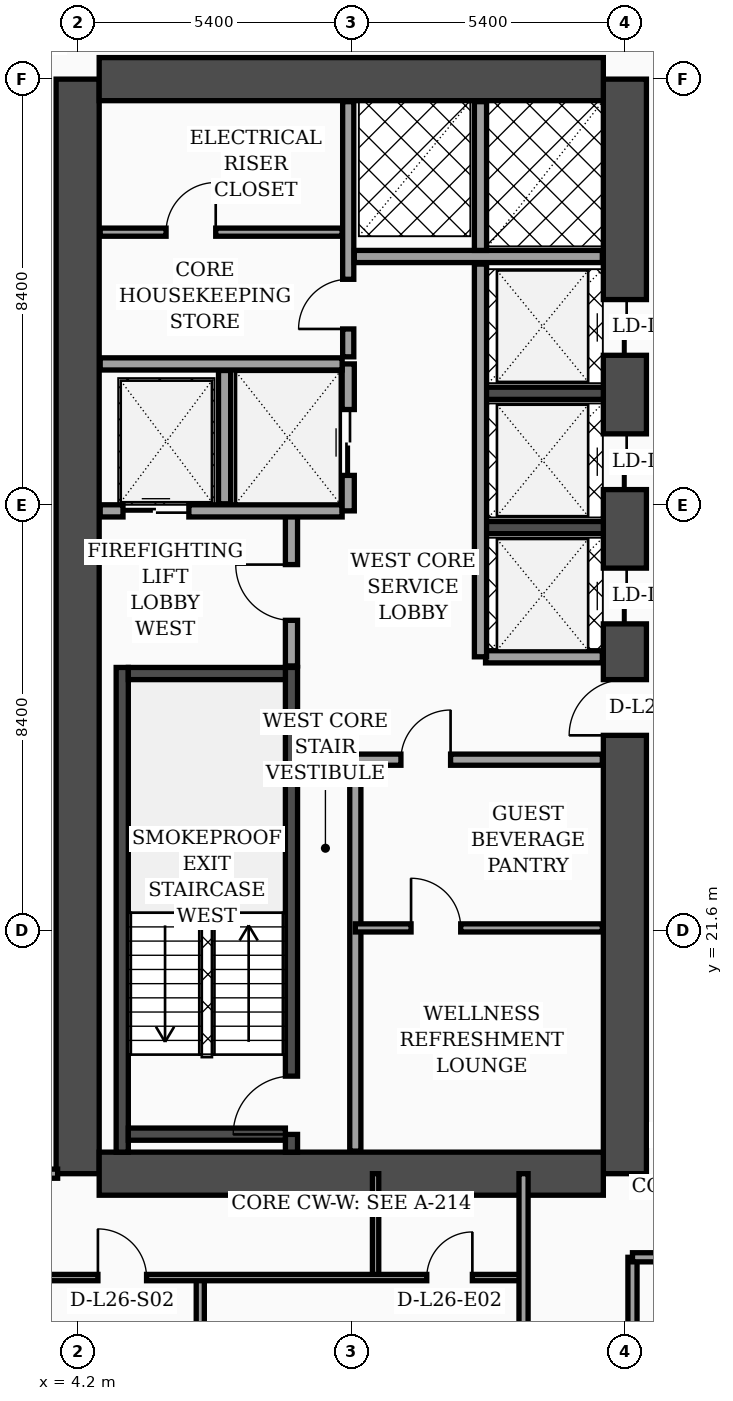
"""IFC4 building model, lengths in metres.
Left out: names, types, materials, properties, quantities, classifications, styles, units other than length and angle.
Written with IfcOpenShell. Run it as: python <this file> out.ifc"""

import sys

from ifc_helpers import new_model, si_unit, direction, frame, frame_2d, origin, place, context, subcontext, project, spatial, rectangle, extrude, element, fill, save


model = new_model("IFC4")
c1 = context("Model", 3, precision=1e-05, world=origin(), true_north=direction((0.0, 1.0)))
c2 = subcontext(c1, "Body", "Model", "MODEL_VIEW")
j1 = project(units=[si_unit("LENGTHUNIT", "METRE"), si_unit("PLANEANGLEUNIT", "RADIAN")], contexts=[c1])
p1 = place(None, origin())
s1 = spatial("IfcSite", under=j1, at=p1, CompositionType="ELEMENT")
p2 = place(p1, origin())
s2 = spatial("IfcBuilding", under=s1, at=p2, CompositionType="ELEMENT")
p3 = place(p2, frame((0.0, 0.0, 108.8)))
s3 = spatial("IfcBuildingStorey", under=s2, at=p3, CompositionType="ELEMENT", Elevation=108.8)
p4 = place(p3, frame((4.2, 16.8, 0.0), z_axis=(0.0, 0.0, 1.0), x_axis=(0.0, 1.0, 0.0)))
e1 = element("IfcWall", 1, at=p4, inside=s3, PredefinedType="SHEAR", context=c2, shape_type="SweptSolid", body=[
    extrude(rectangle(XDim=21.6, YDim=0.85, at=frame_2d((10.8, 0.0))), origin(), (0.0, 0.0, 1.0), 3.56),
])
p5 = place(p3, frame((15.0, 16.8, 0.0), z_axis=(0.0, 0.0, 1.0), x_axis=(0.0, 1.0, 0.0)))
e2 = element("IfcWall", 2, at=p5, inside=s3, PredefinedType="SHEAR", context=c2, shape_type="SweptSolid", body=[
    extrude(rectangle(XDim=21.6, YDim=0.85, at=frame_2d((10.8, 0.0))), origin(), (0.0, 0.0, 1.0), 3.56),
])
p6 = place(p5, frame((8.65, 0.0, 0.0)))
e3 = element("IfcOpeningElement", 3, at=p6, cuts=e2, PredefinedType="OPENING", context=c2, shape_type="SweptSolid", body=[
    extrude(rectangle(XDim=1.1, YDim=2.2, at=frame_2d((0.55, 1.1))), frame((0.0, 0.435, 0.0), z_axis=(0.0, -1.0, 0.0), x_axis=(1.0, 0.0, 0.0)), (0.0, 0.0, 1.0), 0.87),
])
p7 = place(p5, frame((10.85, 0.0, 0.0)))
e4 = element("IfcOpeningElement", 4, at=p7, cuts=e2, PredefinedType="OPENING", context=c2, shape_type="SweptSolid", body=[
    extrude(rectangle(XDim=1.1, YDim=2.2, at=frame_2d((0.55, 1.1))), frame((0.0, 0.435, 0.0), z_axis=(0.0, -1.0, 0.0), x_axis=(1.0, 0.0, 0.0)), (0.0, 0.0, 1.0), 0.87),
])
p8 = place(p5, frame((13.5, 0.0, 0.0)))
e5 = element("IfcOpeningElement", 5, at=p8, cuts=e2, PredefinedType="OPENING", context=c2, shape_type="SweptSolid", body=[
    extrude(rectangle(XDim=1.1, YDim=2.2, at=frame_2d((0.55, 1.1))), frame((0.0, 0.435, 0.0), z_axis=(0.0, -1.0, 0.0), x_axis=(1.0, 0.0, 0.0)), (0.0, 0.0, 1.0), 0.87),
])
p9 = place(p5, frame((16.15, 0.0, 0.0)))
e6 = element("IfcOpeningElement", 6, at=p9, cuts=e2, PredefinedType="OPENING", context=c2, shape_type="SweptSolid", body=[
    extrude(rectangle(XDim=1.1, YDim=2.2, at=frame_2d((0.55, 1.1))), frame((0.0, 0.435, 0.0), z_axis=(0.0, -1.0, 0.0), x_axis=(1.0, 0.0, 0.0)), (0.0, 0.0, 1.0), 0.87),
])
for number, where, z_axis, x_axis in (
    (7, (4.625, 38.4, 0.0), (0.0, 0.0, 1.0), (1.0, 0.0, 0.0)),
    (8, (4.625, 16.8, 0.0), (0.0, 0.0, 1.0), (1.0, 0.0, 0.0)),
):
    element("IfcWall", number, at=place(p3, frame(where, z_axis=z_axis, x_axis=x_axis)), inside=s3, PredefinedType="SHEAR", context=c2, shape_type="SweptSolid", body=[
        extrude(rectangle(XDim=9.95, YDim=0.85, at=frame_2d((4.975, 0.0))), origin(), (0.0, 0.0, 1.0), 3.56),
    ])
p10 = place(p3, frame((5.08, 17.225, 0.0), z_axis=(0.0, 0.0, 1.0), x_axis=(0.0, 1.0, 0.0)))
e9 = element("IfcWall", 9, at=p10, inside=s3, PredefinedType="SOLIDWALL", context=c2, shape_type="SweptSolid", body=[
    extrude(rectangle(XDim=9.565, YDim=0.24, at=frame_2d((4.782, 0.0))), origin(), (0.0, 0.0, 1.0), 3.56),
])
p11 = place(p3, frame((8.42, 17.225, 0.0), z_axis=(0.0, 0.0, 1.0), x_axis=(0.0, 1.0, 0.0)))
e10 = element("IfcWall", 10, at=p11, inside=s3, PredefinedType="SOLIDWALL", context=c2, shape_type="SweptSolid", body=[
    extrude(rectangle(XDim=9.565, YDim=0.24, at=frame_2d((4.782, 0.0))), origin(), (0.0, 0.0, 1.0), 3.56),
])
p12 = place(p11, frame((0.35, 0.0, 0.0)))
e11 = element("IfcOpeningElement", 11, at=p12, cuts=e10, PredefinedType="OPENING", context=c2, shape_type="SweptSolid", body=[
    extrude(rectangle(XDim=1.15, YDim=2.2, at=frame_2d((0.575, 1.1))), frame((0.0, 0.13, 0.0), z_axis=(0.0, -1.0, 0.0), x_axis=(1.0, 0.0, 0.0)), (0.0, 0.0, 1.0), 0.26),
])
for number, where, z_axis, x_axis in (
    (12, (5.2, 17.58, 0.0), (0.0, 0.0, 1.0), (1.0, 0.0, 0.0)),
    (13, (5.2, 26.67, 0.0), (0.0, 0.0, 1.0), (1.0, 0.0, 0.0)),
):
    element("IfcWall", number, at=place(p3, frame(where, z_axis=z_axis, x_axis=x_axis)), inside=s3, PredefinedType="SOLIDWALL", context=c2, shape_type="SweptSolid", body=[
        extrude(rectangle(XDim=3.1, YDim=0.24, at=frame_2d((1.55, 0.0))), origin(), (0.0, 0.0, 1.0), 3.56),
    ])
for number, where, z_axis, x_axis in (
    (14, (12.18, 29.55, 0.0), (0.0, 0.0, 1.0), (1.0, 0.0, 0.0)),
    (15, (12.18, 32.2, 0.0), (0.0, 0.0, 1.0), (1.0, 0.0, 0.0)),
):
    element("IfcWall", number, at=place(p3, frame(where, z_axis=z_axis, x_axis=x_axis)), inside=s3, PredefinedType="SOLIDWALL", context=c2, shape_type="SweptSolid", body=[
        extrude(rectangle(XDim=2.395, YDim=0.24, at=frame_2d((1.198, 0.0))), origin(), (0.0, 0.0, 1.0), 3.56),
    ])
p13 = place(p3, frame((8.42, 26.82, 0.0), z_axis=(0.0, 0.0, 1.0), x_axis=(0.0, 1.0, 0.0)))
e16 = element("IfcWall", 16, at=p13, inside=s3, PredefinedType="SOLIDWALL", context=c2, shape_type="SweptSolid", body=[
    extrude(rectangle(XDim=3.0, YDim=0.24, at=frame_2d((1.5, 0.0))), origin(), (0.0, 0.0, 1.0), 3.56),
])
p14 = place(p13, frame((0.9, 0.0, 0.0)))
e17 = element("IfcOpeningElement", 17, at=p14, cuts=e16, PredefinedType="OPENING", context=c2, shape_type="SweptSolid", body=[
    extrude(rectangle(XDim=1.1, YDim=2.2, at=frame_2d((0.55, 1.1))), frame((0.0, 0.13, 0.0), z_axis=(0.0, -1.0, 0.0), x_axis=(1.0, 0.0, 0.0)), (0.0, 0.0, 1.0), 0.26),
])
p15 = place(p3, frame((4.645, 29.88, 0.0), z_axis=(0.0, 0.0, 1.0), x_axis=(1.0, 0.0, 0.0)))
e18 = element("IfcWall", 18, at=p15, inside=s3, PredefinedType="SOLIDWALL", context=c2, shape_type="SweptSolid", body=[
    extrude(rectangle(XDim=4.775, YDim=0.24, at=frame_2d((2.387, 0.0))), origin(), (0.0, 0.0, 1.0), 3.56),
])
p16 = place(p15, frame((0.45, 0.0, 0.0)))
e19 = element("IfcOpeningElement", 19, at=p16, cuts=e18, PredefinedType="OPENING", context=c2, shape_type="SweptSolid", body=[
    extrude(rectangle(XDim=1.3, YDim=2.35, at=frame_2d((0.65, 1.175))), frame((0.0, 0.13, 0.0), z_axis=(0.0, -1.0, 0.0), x_axis=(1.0, 0.0, 0.0)), (0.0, 0.0, 1.0), 0.26),
])
p17 = place(p3, frame((7.1, 30.02, 0.0), z_axis=(0.0, 0.0, 1.0), x_axis=(0.0, 1.0, 0.0)))
e20 = element("IfcWall", 20, at=p17, inside=s3, PredefinedType="SOLIDWALL", context=c2, shape_type="SweptSolid", body=[
    extrude(rectangle(XDim=2.63, YDim=0.24, at=frame_2d((1.315, 0.0))), origin(), (0.0, 0.0, 1.0), 3.56),
])
p18 = place(p3, frame((9.54, 29.88, 0.0), z_axis=(0.0, 0.0, 1.0), x_axis=(0.0, 1.0, 0.0)))
e21 = element("IfcWall", 21, at=p18, inside=s3, PredefinedType="SOLIDWALL", context=c2, shape_type="SweptSolid", body=[
    extrude(rectangle(XDim=2.9, YDim=0.24, at=frame_2d((1.45, 0.0))), origin(), (0.0, 0.0, 1.0), 3.56),
])
p19 = place(p18, frame((0.7, 0.0, 0.0)))
e22 = element("IfcOpeningElement", 22, at=p19, cuts=e21, PredefinedType="OPENING", context=c2, shape_type="SweptSolid", body=[
    extrude(rectangle(XDim=1.3, YDim=2.35, at=frame_2d((0.65, 1.175))), frame((0.0, 0.13, 0.0), z_axis=(0.0, -1.0, 0.0), x_axis=(1.0, 0.0, 0.0)), (0.0, 0.0, 1.0), 0.26),
])
p20 = place(p3, frame((4.645, 32.78, 0.0), z_axis=(0.0, 0.0, 1.0), x_axis=(1.0, 0.0, 0.0)))
e23 = element("IfcWall", 23, at=p20, inside=s3, PredefinedType="SOLIDWALL", context=c2, shape_type="SweptSolid", body=[
    extrude(rectangle(XDim=4.775, YDim=0.24, at=frame_2d((2.387, 0.0))), origin(), (0.0, 0.0, 1.0), 3.19),
])
p21 = place(p3, frame((9.68, 17.245, 0.0), z_axis=(0.0, 0.0, 1.0), x_axis=(0.0, 1.0, 0.0)))
e24 = element("IfcWall", 24, at=p21, inside=s3, PredefinedType="SOLIDWALL", context=c2, shape_type="SweptSolid", body=[
    extrude(rectangle(XDim=7.755, YDim=0.22, at=frame_2d((3.877, 0.0))), origin(), (0.0, 0.0, 1.0), 3.56),
])
p22 = place(p3, frame((4.645, 35.38, 0.0), z_axis=(0.0, 0.0, 1.0), x_axis=(1.0, 0.0, 0.0)))
e25 = element("IfcWall", 25, at=p22, inside=s3, PredefinedType="PARTITIONING", context=c2, shape_type="SweptSolid", body=[
    extrude(rectangle(XDim=4.775, YDim=0.16, at=frame_2d((2.387, 0.0))), origin(), (0.0, 0.0, 1.0), 3.56),
])
p23 = place(p22, frame((1.3, 0.0, 0.0)))
e26 = element("IfcOpeningElement", 26, at=p23, cuts=e25, PredefinedType="OPENING", context=c2, shape_type="SweptSolid", body=[
    extrude(rectangle(XDim=0.98, YDim=2.15, at=frame_2d((0.49, 1.075))), frame((0.0, 0.09, 0.0), z_axis=(0.0, -1.0, 0.0), x_axis=(1.0, 0.0, 0.0)), (0.0, 0.0, 1.0), 0.18),
])
p24 = place(p3, frame((9.54, 32.92, 0.0), z_axis=(0.0, 0.0, 1.0), x_axis=(0.0, 1.0, 0.0)))
e27 = element("IfcWall", 27, at=p24, inside=s3, PredefinedType="SOLIDWALL", context=c2, shape_type="SweptSolid", body=[
    extrude(rectangle(XDim=5.035, YDim=0.22, at=frame_2d((2.518, 0.0))), origin(), (0.0, 0.0, 1.0), 3.56),
])
p25 = place(p24, frame((0.55, 0.0, 0.0)))
e28 = element("IfcOpeningElement", 28, at=p25, cuts=e27, PredefinedType="OPENING", context=c2, shape_type="SweptSolid", body=[
    extrude(rectangle(XDim=0.98, YDim=2.15, at=frame_2d((0.49, 1.075))), frame((0.0, 0.12, 0.0), z_axis=(0.0, -1.0, 0.0), x_axis=(1.0, 0.0, 0.0)), (0.0, 0.0, 1.0), 0.24),
])
p26 = place(p3, frame((9.68, 21.65, 0.0), z_axis=(0.0, 0.0, 1.0), x_axis=(1.0, 0.0, 0.0)))
e29 = element("IfcWall", 29, at=p26, inside=s3, PredefinedType="PARTITIONING", context=c2, shape_type="SweptSolid", body=[
    extrude(rectangle(XDim=4.875, YDim=0.16, at=frame_2d((2.438, 0.0))), origin(), (0.0, 0.0, 1.0), 3.09),
])
p27 = place(p26, frame((1.1, 0.0, 0.0)))
e30 = element("IfcOpeningElement", 30, at=p27, cuts=e29, PredefinedType="OPENING", context=c2, shape_type="SweptSolid", body=[
    extrude(rectangle(XDim=0.98, YDim=2.15, at=frame_2d((0.49, 1.075))), frame((0.0, 0.09, 0.0), z_axis=(0.0, -1.0, 0.0), x_axis=(1.0, 0.0, 0.0)), (0.0, 0.0, 1.0), 0.18),
])
p28 = place(p3, frame((9.68, 24.97, 0.0), z_axis=(0.0, 0.0, 1.0), x_axis=(1.0, 0.0, 0.0)))
e31 = element("IfcWall", 31, at=p28, inside=s3, PredefinedType="SOLIDWALL", context=c2, shape_type="SweptSolid", body=[
    extrude(rectangle(XDim=4.875, YDim=0.22, at=frame_2d((2.438, 0.0))), origin(), (0.0, 0.0, 1.0), 2.84),
])
p29 = place(p28, frame((0.9, 0.0, 0.0)))
e32 = element("IfcOpeningElement", 32, at=p29, cuts=e31, PredefinedType="OPENING", context=c2, shape_type="SweptSolid", body=[
    extrude(rectangle(XDim=0.98, YDim=2.15, at=frame_2d((0.49, 1.075))), frame((0.0, 0.12, 0.0), z_axis=(0.0, -1.0, 0.0), x_axis=(1.0, 0.0, 0.0)), (0.0, 0.0, 1.0), 0.24),
])
p30 = place(p3, frame((12.25, 27.0, 0.0), z_axis=(0.0, 0.0, 1.0), x_axis=(1.0, 0.0, 0.0)))
e33 = element("IfcWall", 33, at=p30, inside=s3, PredefinedType="SOLIDWALL", context=c2, shape_type="SweptSolid", body=[
    extrude(rectangle(XDim=2.305, YDim=0.24, at=frame_2d((1.152, 0.0))), origin(), (0.0, 0.0, 1.0), 3.56),
])
p31 = place(p3, frame((12.15, 27.0, 0.0), z_axis=(0.0, 0.0, 1.0), x_axis=(0.0, 1.0, 0.0)))
e34 = element("IfcWall", 34, at=p31, inside=s3, PredefinedType="SOLIDWALL", context=c2, shape_type="SweptSolid", body=[
    extrude(rectangle(XDim=7.75, YDim=0.24, at=frame_2d((3.875, 0.0))), origin(), (0.0, 0.0, 1.0), 3.56),
])
p32 = place(p3, frame((9.66, 34.9, 0.0), z_axis=(0.0, 0.0, 1.0), x_axis=(1.0, 0.0, 0.0)))
e35 = element("IfcWall", 35, at=p32, inside=s3, PredefinedType="SOLIDWALL", context=c2, shape_type="SweptSolid", body=[
    extrude(rectangle(XDim=4.895, YDim=0.24, at=frame_2d((2.448, 0.0))), origin(), (0.0, 0.0, 1.0), 3.56),
])
p33 = place(p3, frame((12.15, 35.02, 0.0), z_axis=(0.0, 0.0, 1.0), x_axis=(0.0, 1.0, 0.0)))
e36 = element("IfcWall", 36, at=p33, inside=s3, PredefinedType="SOLIDWALL", context=c2, shape_type="SweptSolid", body=[
    extrude(rectangle(XDim=2.935, YDim=0.24, at=frame_2d((1.468, 0.0))), origin(), (0.0, 0.0, 1.0), 3.56),
])
p34 = place(p3, frame((0.08, 16.8, 0.0), z_axis=(0.0, 0.0, 1.0), x_axis=(1.0, 0.0, 0.0)))
e37 = element("IfcWall", 37, at=p34, inside=s3, PredefinedType="PARTITIONING", context=c2, shape_type="SweptSolid", body=[
    extrude(rectangle(XDim=3.725, YDim=0.18, at=frame_2d((1.862, 0.0))), origin(), (0.0, 0.0, 1.0), 2.84),
])
p35 = place(p3, frame((10.08, 14.75, 0.0), z_axis=(0.0, 0.0, 1.0), x_axis=(0.0, 1.0, 0.0)))
e38 = element("IfcWall", 38, at=p35, inside=s3, PredefinedType="PARTITIONING", context=c2, shape_type="SweptSolid", body=[
    extrude(rectangle(XDim=2.05, YDim=0.125, at=frame_2d((1.025, 0.0))), origin(), (0.0, 0.0, 1.0), 3.56),
])
p36 = place(p3, frame((6.62, 11.35, 0.0), z_axis=(0.0, 0.0, 1.0), x_axis=(0.0, 1.0, 0.0)))
e39 = element("IfcWall", 39, at=p36, inside=s3, PredefinedType="PARTITIONING", context=c2, shape_type="SweptSolid", body=[
    extrude(rectangle(XDim=3.4, YDim=0.16, at=frame_2d((1.7, 0.0))), origin(), (0.0, 0.0, 1.0), 3.56),
])
p37 = place(p36, frame((1.22, 0.0, 0.0)))
e40 = element("IfcOpeningElement", 40, at=p37, cuts=e39, PredefinedType="OPENING", context=c2, shape_type="SweptSolid", body=[
    extrude(rectangle(XDim=0.96, YDim=2.2, at=frame_2d((0.48, 1.1))), frame((0.0, 0.09, 0.0), z_axis=(0.0, -1.0, 0.0), x_axis=(1.0, 0.0, 0.0)), (0.0, 0.0, 1.0), 0.18),
])
p38 = place(p3, frame((0.08, 14.75, 0.0), z_axis=(0.0, 0.0, 1.0), x_axis=(1.0, 0.0, 0.0)))
e41 = element("IfcWall", 41, at=p38, inside=s3, PredefinedType="PARTITIONING", context=c2, shape_type="SweptSolid", body=[
    extrude(rectangle(XDim=12.92, YDim=0.125, at=frame_2d((6.46, 0.0))), origin(), (0.0, 0.0, 1.0), 2.84),
])
p39 = place(p38, frame((4.52, 0.0, 0.0)))
e42 = element("IfcOpeningElement", 42, at=p39, cuts=e41, PredefinedType="OPENING", context=c2, shape_type="SweptSolid", body=[
    extrude(rectangle(XDim=0.96, YDim=2.2, at=frame_2d((0.48, 1.1))), frame((0.0, 0.073, 0.0), z_axis=(0.0, -1.0, 0.0), x_axis=(1.0, 0.0, 0.0)), (0.0, 0.0, 1.0), 0.145),
])
p40 = place(p38, frame((11.01, 0.0, 0.0)))
e43 = element("IfcOpeningElement", 43, at=p40, cuts=e41, PredefinedType="OPENING", context=c2, shape_type="SweptSolid", body=[
    extrude(rectangle(XDim=0.9, YDim=2.15, at=frame_2d((0.45, 1.075))), frame((0.0, 0.073, 0.0), z_axis=(0.0, -1.0, 0.0), x_axis=(1.0, 0.0, 0.0)), (0.0, 0.0, 1.0), 0.145),
])
p41 = place(p3, frame((13.0, 2.44, 0.0), z_axis=(0.0, 0.0, 1.0), x_axis=(0.0, 1.0, 0.0)))
e44 = element("IfcWall", 44, at=p41, inside=s3, PredefinedType="PARTITIONING", context=c2, shape_type="SweptSolid", body=[
    extrude(rectangle(XDim=14.36, YDim=0.18, at=frame_2d((7.18, 0.0))), origin(), (0.0, 0.0, 1.0), 2.84),
])
p42 = place(p41, frame((3.01, 0.0, 0.0)))
e45 = element("IfcOpeningElement", 45, at=p42, cuts=e44, PredefinedType="OPENING", context=c2, shape_type="SweptSolid", body=[
    extrude(rectangle(XDim=1.02, YDim=2.2, at=frame_2d((0.51, 1.1))), frame((0.0, 0.1, 0.0), z_axis=(0.0, -1.0, 0.0), x_axis=(1.0, 0.0, 0.0)), (0.0, 0.0, 1.0), 0.2),
])
p43 = place(p41, frame((10.1, 0.0, 0.0)))
e46 = element("IfcOpeningElement", 46, at=p43, cuts=e44, PredefinedType="OPENING", context=c2, shape_type="SweptSolid", body=[
    extrude(rectangle(XDim=1.02, YDim=2.2, at=frame_2d((0.51, 1.1))), frame((0.0, 0.1, 0.0), z_axis=(0.0, -1.0, 0.0), x_axis=(1.0, 0.0, 0.0)), (0.0, 0.0, 1.0), 0.2),
])
p44 = place(p3, frame((15.15, 2.44, 0.0), z_axis=(0.0, 0.0, 1.0), x_axis=(0.0, 1.0, 0.0)))
e47 = element("IfcWall", 47, at=p44, inside=s3, PredefinedType="PARTITIONING", context=c2, shape_type="SweptSolid", body=[
    extrude(rectangle(XDim=12.71, YDim=0.18, at=frame_2d((6.355, 0.0))), origin(), (0.0, 0.0, 1.0), 3.04),
])
p45 = place(p3, frame((15.15, 15.15, 0.0), z_axis=(0.0, 0.0, 1.0), x_axis=(1.0, 0.0, 0.0)))
e48 = element("IfcWall", 48, at=p45, inside=s3, PredefinedType="PARTITIONING", context=c2, shape_type="SweptSolid", body=[
    extrude(rectangle(XDim=6.45, YDim=0.18, at=frame_2d((3.225, 0.0))), origin(), (0.0, 0.0, 1.0), 2.49),
])
p46 = place(p45, frame((1.74, 0.0, 0.0)))
e49 = element("IfcOpeningElement", 49, at=p46, cuts=e48, PredefinedType="OPENING", context=c2, shape_type="SweptSolid", body=[
    extrude(rectangle(XDim=1.02, YDim=2.2, at=frame_2d((0.51, 1.1))), frame((0.0, 0.1, 0.0), z_axis=(0.0, -1.0, 0.0), x_axis=(1.0, 0.0, 0.0)), (0.0, 0.0, 1.0), 0.2),
])
p47 = place(p14, origin())
e50 = element("IfcDoor", 50, at=p47, inside=s3, OperationType="SINGLE_SWING_RIGHT", PredefinedType="DOOR", context=c2, shape_type="SweptSolid", body=[
    extrude(rectangle(XDim=1.1, YDim=2.2, at=frame_2d((0.55, 1.1))), frame((0.0, 0.025, 0.0), z_axis=(0.0, -1.0, 0.0), x_axis=(1.0, 0.0, 0.0)), (0.0, 0.0, 1.0), 0.05),
])
fill(e17, e50)
p48 = place(p16, origin())
e51 = element("IfcDoor", 51, at=p48, inside=s3, OperationType="DOUBLE_DOOR_SLIDING", PredefinedType="DOOR", context=c2, shape_type="SweptSolid", body=[
    extrude(rectangle(XDim=1.3, YDim=2.35, at=frame_2d((0.65, 1.175))), frame((0.0, 0.025, 0.0), z_axis=(0.0, -1.0, 0.0), x_axis=(1.0, 0.0, 0.0)), (0.0, 0.0, 1.0), 0.05),
])
fill(e19, e51)
p49 = place(p19, origin())
e52 = element("IfcDoor", 52, at=p49, inside=s3, OperationType="DOUBLE_DOOR_SLIDING", PredefinedType="DOOR", context=c2, shape_type="SweptSolid", body=[
    extrude(rectangle(XDim=1.3, YDim=2.35, at=frame_2d((0.65, 1.175))), frame((0.0, 0.025, 0.0), z_axis=(0.0, -1.0, 0.0), x_axis=(1.0, 0.0, 0.0)), (0.0, 0.0, 1.0), 0.05),
])
fill(e22, e52)
p50 = place(p23, origin())
e53 = element("IfcDoor", 53, at=p50, inside=s3, OperationType="SINGLE_SWING_RIGHT", PredefinedType="DOOR", context=c2, shape_type="SweptSolid", body=[
    extrude(rectangle(XDim=0.98, YDim=2.15, at=frame_2d((0.49, 1.075))), frame((0.0, 0.025, 0.0), z_axis=(0.0, -1.0, 0.0), x_axis=(1.0, 0.0, 0.0)), (0.0, 0.0, 1.0), 0.05),
])
fill(e26, e53)
p51 = place(p25, origin())
e54 = element("IfcDoor", 54, at=p51, inside=s3, OperationType="SINGLE_SWING_LEFT", PredefinedType="DOOR", context=c2, shape_type="SweptSolid", body=[
    extrude(rectangle(XDim=0.98, YDim=2.15, at=frame_2d((0.49, 1.075))), frame((0.0, 0.025, 0.0), z_axis=(0.0, -1.0, 0.0), x_axis=(1.0, 0.0, 0.0)), (0.0, 0.0, 1.0), 0.05),
])
fill(e28, e54)
p52 = place(p27, origin())
e55 = element("IfcDoor", 55, at=p52, inside=s3, OperationType="SINGLE_SWING_LEFT", PredefinedType="DOOR", context=c2, shape_type="SweptSolid", body=[
    extrude(rectangle(XDim=0.98, YDim=2.15, at=frame_2d((0.49, 1.075))), frame((0.0, 0.025, 0.0), z_axis=(0.0, -1.0, 0.0), x_axis=(1.0, 0.0, 0.0)), (0.0, 0.0, 1.0), 0.05),
])
fill(e30, e55)
p53 = place(p29, origin())
e56 = element("IfcDoor", 56, at=p53, inside=s3, OperationType="SINGLE_SWING_RIGHT", PredefinedType="DOOR", context=c2, shape_type="SweptSolid", body=[
    extrude(rectangle(XDim=0.98, YDim=2.15, at=frame_2d((0.49, 1.075))), frame((0.0, 0.025, 0.0), z_axis=(0.0, -1.0, 0.0), x_axis=(1.0, 0.0, 0.0)), (0.0, 0.0, 1.0), 0.05),
])
fill(e32, e56)
p54 = place(p39, origin())
e57 = element("IfcDoor", 57, at=p54, inside=s3, OperationType="SINGLE_SWING_LEFT", PredefinedType="DOOR", context=c2, shape_type="SweptSolid", body=[
    extrude(rectangle(XDim=0.96, YDim=2.2, at=frame_2d((0.48, 1.1))), frame((0.0, 0.025, 0.0), z_axis=(0.0, -1.0, 0.0), x_axis=(1.0, 0.0, 0.0)), (0.0, 0.0, 1.0), 0.05),
])
fill(e42, e57)
p55 = place(p40, origin())
e58 = element("IfcDoor", 58, at=p55, inside=s3, OperationType="SINGLE_SWING_RIGHT", PredefinedType="DOOR", context=c2, shape_type="SweptSolid", body=[
    extrude(rectangle(XDim=0.9, YDim=2.15, at=frame_2d((0.45, 1.075))), frame((0.0, 0.025, 0.0), z_axis=(0.0, -1.0, 0.0), x_axis=(1.0, 0.0, 0.0)), (0.0, 0.0, 1.0), 0.05),
])
fill(e43, e58)
p56 = place(p12, origin())
e59 = element("IfcDoor", 59, at=p56, inside=s3, OperationType="SINGLE_SWING_LEFT", PredefinedType="DOOR", context=c2, shape_type="SweptSolid", body=[
    extrude(rectangle(XDim=1.15, YDim=2.2, at=frame_2d((0.575, 1.1))), frame((0.0, 0.025, 0.0), z_axis=(0.0, -1.0, 0.0), x_axis=(1.0, 0.0, 0.0)), (0.0, 0.0, 1.0), 0.05),
])
fill(e11, e59)
p57 = place(p6, origin())
e60 = element("IfcDoor", 60, at=p57, inside=s3, OperationType="SINGLE_SWING_LEFT", PredefinedType="DOOR", context=c2, shape_type="SweptSolid", body=[
    extrude(rectangle(XDim=1.1, YDim=2.2, at=frame_2d((0.55, 1.1))), frame((0.0, 0.025, 0.0), z_axis=(0.0, -1.0, 0.0), x_axis=(1.0, 0.0, 0.0)), (0.0, 0.0, 1.0), 0.05),
])
fill(e3, e60)
p58 = place(p7, origin())
e61 = element("IfcDoor", 61, at=p58, inside=s3, OperationType="DOUBLE_DOOR_SLIDING", PredefinedType="DOOR", context=c2, shape_type="SweptSolid", body=[
    extrude(rectangle(XDim=1.1, YDim=2.2, at=frame_2d((0.55, 1.1))), frame((0.0, 0.025, 0.0), z_axis=(0.0, -1.0, 0.0), x_axis=(1.0, 0.0, 0.0)), (0.0, 0.0, 1.0), 0.05),
])
fill(e4, e61)
p59 = place(p8, origin())
e62 = element("IfcDoor", 62, at=p59, inside=s3, OperationType="DOUBLE_DOOR_SLIDING", PredefinedType="DOOR", context=c2, shape_type="SweptSolid", body=[
    extrude(rectangle(XDim=1.1, YDim=2.2, at=frame_2d((0.55, 1.1))), frame((0.0, 0.025, 0.0), z_axis=(0.0, -1.0, 0.0), x_axis=(1.0, 0.0, 0.0)), (0.0, 0.0, 1.0), 0.05),
])
fill(e5, e62)
p60 = place(p9, origin())
e63 = element("IfcDoor", 63, at=p60, inside=s3, OperationType="DOUBLE_DOOR_SLIDING", PredefinedType="DOOR", context=c2, shape_type="SweptSolid", body=[
    extrude(rectangle(XDim=1.1, YDim=2.2, at=frame_2d((0.55, 1.1))), frame((0.0, 0.025, 0.0), z_axis=(0.0, -1.0, 0.0), x_axis=(1.0, 0.0, 0.0)), (0.0, 0.0, 1.0), 0.05),
])
fill(e6, e63)
save(model, sys.argv[1])
